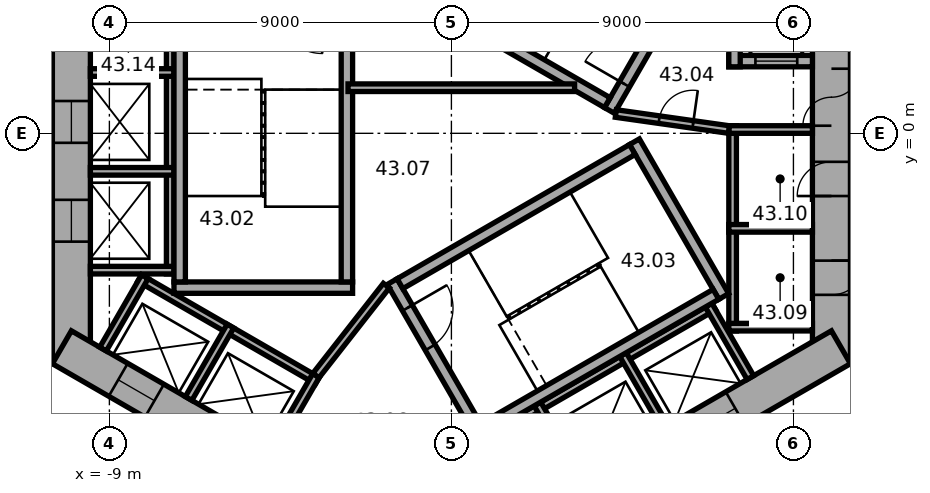
"""IFC4 building model, lengths in metres.
Left out: names, types, materials, properties, quantities, classifications, styles, units other than length and angle.
Written with IfcOpenShell. Run it as: python <this file> out.ifc"""

import sys

from ifc_helpers import new_model, si_unit, direction, frame, frame_2d, origin, place, context, subcontext, project, spatial, rectangle, extrude, element, fill, save


model = new_model("IFC4")
c1 = context("Model", 3, precision=1e-05, world=origin(), true_north=direction((0.0, 1.0)))
c2 = subcontext(c1, "Body", "Model", "MODEL_VIEW")
j1 = project(units=[si_unit("LENGTHUNIT", "METRE"), si_unit("PLANEANGLEUNIT", "RADIAN")], contexts=[c1])
p1 = place(None, origin())
s1 = spatial("IfcSite", under=j1, at=p1, CompositionType="ELEMENT")
p2 = place(p1, origin())
s2 = spatial("IfcBuilding", under=s1, at=p2, CompositionType="ELEMENT")
p3 = place(p2, frame((0.0, 0.0, 176.2)))
s3 = spatial("IfcBuildingStorey", under=s2, at=p3, CompositionType="ELEMENT", Elevation=176.2)
p4 = place(p3, frame((10.0, -6.062, 0.0), z_axis=(0.0, 0.0, 1.0), x_axis=(0.0, 1.0, 0.0)))
e1 = element("IfcWall", 1, at=p4, inside=s3, PredefinedType="SHEAR", context=c2, shape_type="SweptSolid", body=[
    extrude(rectangle(XDim=12.125, YDim=1.0, at=frame_2d((6.062, 0.0))), origin(), (0.0, 0.0, 1.0), 3.7),
])
p5 = place(p4, frame((6.262, 0.0, 0.0)))
e2 = element("IfcOpeningElement", 2, at=p5, cuts=e1, PredefinedType="OPENING", context=c2, shape_type="SweptSolid", body=[
    extrude(rectangle(XDim=1.5, YDim=2.1, at=frame_2d((0.75, 1.05))), frame((0.0, 0.51, 0.0), z_axis=(0.0, -1.0, 0.0), x_axis=(1.0, 0.0, 0.0)), (0.0, 0.0, 1.0), 1.02),
])
p6 = place(p4, frame((1.812, 0.0, 0.0)))
e3 = element("IfcOpeningElement", 3, at=p6, cuts=e1, PredefinedType="OPENING", context=c2, shape_type="SweptSolid", body=[
    extrude(rectangle(XDim=0.9, YDim=2.1, at=frame_2d((0.45, 1.05))), frame((0.0, 0.51, 0.0), z_axis=(0.0, -1.0, 0.0), x_axis=(1.0, 0.0, 0.0)), (0.0, 0.0, 1.0), 1.02),
])
p7 = place(p4, frame((4.412, 0.0, 0.0)))
e4 = element("IfcOpeningElement", 4, at=p7, cuts=e1, PredefinedType="OPENING", context=c2, shape_type="SweptSolid", body=[
    extrude(rectangle(XDim=0.9, YDim=2.1, at=frame_2d((0.45, 1.05))), frame((0.0, 0.51, 0.0), z_axis=(0.0, -1.0, 0.0), x_axis=(1.0, 0.0, 0.0)), (0.0, 0.0, 1.0), 1.02),
])
p8 = place(p3, frame((-10.0, 6.062, 0.0), z_axis=(0.0, 0.0, 1.0), x_axis=(0.0, -1.0, 0.0)))
e5 = element("IfcWall", 5, at=p8, inside=s3, PredefinedType="SHEAR", context=c2, shape_type="SweptSolid", body=[
    extrude(rectangle(XDim=12.125, YDim=1.0, at=frame_2d((6.062, 0.0))), origin(), (0.0, 0.0, 1.0), 3.7),
])
p9 = place(p8, frame((5.212, 0.0, 0.0)))
e6 = element("IfcOpeningElement", 6, at=p9, cuts=e5, PredefinedType="OPENING", context=c2, shape_type="SweptSolid", body=[
    extrude(rectangle(XDim=1.1, YDim=2.1, at=frame_2d((0.55, 1.05))), frame((0.0, 0.51, 0.0), z_axis=(0.0, -1.0, 0.0), x_axis=(1.0, 0.0, 0.0)), (0.0, 0.0, 1.0), 1.02),
])
p10 = place(p8, frame((7.812, 0.0, 0.0)))
e7 = element("IfcOpeningElement", 7, at=p10, cuts=e5, PredefinedType="OPENING", context=c2, shape_type="SweptSolid", body=[
    extrude(rectangle(XDim=1.1, YDim=2.1, at=frame_2d((0.55, 1.05))), frame((0.0, 0.51, 0.0), z_axis=(0.0, -1.0, 0.0), x_axis=(1.0, 0.0, 0.0)), (0.0, 0.0, 1.0), 1.02),
])
p11 = place(p3, frame((-10.25, -5.629, 0.0), z_axis=(0.0, 0.0, 1.0), x_axis=(0.866022616891, -0.50000482701, 0.0)))
e8 = element("IfcWall", 8, at=p11, inside=s3, PredefinedType="SHEAR", context=c2, shape_type="SweptSolid", body=[
    extrude(rectangle(XDim=12.125, YDim=1.0, at=frame_2d((6.062, 0.0))), origin(), (0.0, 0.0, 1.0), 3.7),
])
p12 = place(p11, frame((6.262, 0.0, 0.0)))
e9 = element("IfcOpeningElement", 9, at=p12, cuts=e8, PredefinedType="OPENING", context=c2, shape_type="SweptSolid", body=[
    extrude(rectangle(XDim=1.5, YDim=2.1, at=frame_2d((0.75, 1.05))), frame((0.0, 0.51, 0.0), z_axis=(0.0, -1.0, 0.0), x_axis=(1.0, 0.0, 0.0)), (0.0, 0.0, 1.0), 1.02),
])
p13 = place(p11, frame((1.712, 0.0, 0.0)))
e10 = element("IfcOpeningElement", 10, at=p13, cuts=e8, PredefinedType="OPENING", context=c2, shape_type="SweptSolid", body=[
    extrude(rectangle(XDim=1.1, YDim=2.1, at=frame_2d((0.55, 1.05))), frame((0.0, 0.51, 0.0), z_axis=(0.0, -1.0, 0.0), x_axis=(1.0, 0.0, 0.0)), (0.0, 0.0, 1.0), 1.02),
])
p14 = place(p11, frame((4.312, 0.0, 0.0)))
e11 = element("IfcOpeningElement", 11, at=p14, cuts=e8, PredefinedType="OPENING", context=c2, shape_type="SweptSolid", body=[
    extrude(rectangle(XDim=1.1, YDim=2.1, at=frame_2d((0.55, 1.05))), frame((0.0, 0.51, 0.0), z_axis=(0.0, -1.0, 0.0), x_axis=(1.0, 0.0, 0.0)), (0.0, 0.0, 1.0), 1.02),
])
p15 = place(p3, frame((-0.25, -11.691, 0.0), z_axis=(0.0, 0.0, 1.0), x_axis=(0.866022616891, 0.50000482701, 0.0)))
e12 = element("IfcWall", 12, at=p15, inside=s3, PredefinedType="SHEAR", context=c2, shape_type="SweptSolid", body=[
    extrude(rectangle(XDim=12.125, YDim=1.0, at=frame_2d((6.062, 0.0))), origin(), (0.0, 0.0, 1.0), 3.7),
])
p16 = place(p15, frame((2.612, 0.0, 0.0)))
e13 = element("IfcOpeningElement", 13, at=p16, cuts=e12, PredefinedType="OPENING", context=c2, shape_type="SweptSolid", body=[
    extrude(rectangle(XDim=1.1, YDim=2.1, at=frame_2d((0.55, 1.05))), frame((0.0, 0.51, 0.0), z_axis=(0.0, -1.0, 0.0), x_axis=(1.0, 0.0, 0.0)), (0.0, 0.0, 1.0), 1.02),
])
p17 = place(p15, frame((5.212, 0.0, 0.0)))
e14 = element("IfcOpeningElement", 14, at=p17, cuts=e12, PredefinedType="OPENING", context=c2, shape_type="SweptSolid", body=[
    extrude(rectangle(XDim=1.1, YDim=2.1, at=frame_2d((0.55, 1.05))), frame((0.0, 0.51, 0.0), z_axis=(0.0, -1.0, 0.0), x_axis=(1.0, 0.0, 0.0)), (0.0, 0.0, 1.0), 1.02),
])
p18 = place(p15, frame((7.812, 0.0, 0.0)))
e15 = element("IfcOpeningElement", 15, at=p18, cuts=e12, PredefinedType="OPENING", context=c2, shape_type="SweptSolid", body=[
    extrude(rectangle(XDim=1.1, YDim=2.1, at=frame_2d((0.55, 1.05))), frame((0.0, 0.51, 0.0), z_axis=(0.0, -1.0, 0.0), x_axis=(1.0, 0.0, 0.0)), (0.0, 0.0, 1.0), 1.02),
])
p19 = place(p3, frame((7.4, -5.2, 0.0), z_axis=(0.0, 0.0, 1.0), x_axis=(0.0, 1.0, 0.0)))
e16 = element("IfcWall", 16, at=p19, inside=s3, PredefinedType="PARTITIONING", context=c2, shape_type="SweptSolid", body=[
    extrude(rectangle(XDim=5.4, YDim=0.2, at=frame_2d((2.7, 0.0))), origin(), (0.0, 0.0, 1.0), 3.42),
])
for number, where, z_axis, x_axis in (
    (17, (7.3, -5.1, 0.0), (0.0, 0.0, 1.0), (1.0, 0.0, 0.0)),
    (18, (7.3, -2.5, 0.0), (0.0, 0.0, 1.0), (1.0, 0.0, 0.0)),
    (19, (7.3, 0.1, 0.0), (0.0, 0.0, 1.0), (1.0, 0.0, 0.0)),
):
    element("IfcWall", number, at=place(p3, frame(where, z_axis=z_axis, x_axis=x_axis)), inside=s3, PredefinedType="PARTITIONING", context=c2, shape_type="SweptSolid", body=[
        extrude(rectangle(XDim=2.2, YDim=0.2, at=frame_2d((1.1, 0.0))), origin(), (0.0, 0.0, 1.0), 3.42),
    ])
p20 = place(p3, frame((-7.4, 4.3, 0.0), z_axis=(0.0, 0.0, 1.0), x_axis=(0.0, -1.0, 0.0)))
e20 = element("IfcWall", 20, at=p20, inside=s3, PredefinedType="PARTITIONING", context=c2, shape_type="SweptSolid", body=[
    extrude(rectangle(XDim=8.0, YDim=0.2, at=frame_2d((4.0, 0.0))), origin(), (0.0, 0.0, 1.0), 3.42),
])
for number, where, z_axis, x_axis in (
    (21, (-7.3, 1.6, 0.0), (0.0, 0.0, 1.0), (-1.0, 0.0, 0.0)),
    (22, (-7.3, -1.0, 0.0), (0.0, 0.0, 1.0), (-1.0, 0.0, 0.0)),
    (23, (-7.3, -3.6, 0.0), (0.0, 0.0, 1.0), (-1.0, 0.0, 0.0)),
):
    element("IfcWall", number, at=place(p3, frame(where, z_axis=z_axis, x_axis=x_axis)), inside=s3, PredefinedType="PARTITIONING", context=c2, shape_type="SweptSolid", body=[
        extrude(rectangle(XDim=2.2, YDim=0.2, at=frame_2d((1.1, 0.0))), origin(), (0.0, 0.0, 1.0), 3.42),
    ])
p21 = place(p3, frame((-8.203, -3.809, 0.0), z_axis=(0.0, 0.0, 1.0), x_axis=(0.866028230842, -0.499995103361, 0.0)))
e24 = element("IfcWall", 24, at=p21, inside=s3, PredefinedType="PARTITIONING", context=c2, shape_type="SweptSolid", body=[
    extrude(rectangle(XDim=5.4, YDim=0.2, at=frame_2d((2.7, 0.0))), origin(), (0.0, 0.0, 1.0), 3.42),
])
for number, where, z_axis, x_axis in (
    (25, (-8.067, -3.772, 0.0), (0.0, 0.0, 1.0), (-0.5, -0.866, 0.0)),
    (26, (-5.815, -5.072, 0.0), (0.0, 0.0, 1.0), (-0.5, -0.866, 0.0)),
):
    element("IfcWall", number, at=place(p3, frame(where, z_axis=z_axis, x_axis=x_axis)), inside=s3, PredefinedType="PARTITIONING", context=c2, shape_type="SweptSolid", body=[
        extrude(rectangle(XDim=2.2, YDim=0.2, at=frame_2d((1.1, 0.0))), origin(), (0.0, 0.0, 1.0), 3.42),
    ])
p22 = place(p3, frame((-3.563, -6.372, 0.0), z_axis=(0.0, 0.0, 1.0), x_axis=(-0.499994660107, -0.866028486751, 0.0)))
e27 = element("IfcWall", 27, at=p22, inside=s3, PredefinedType="PARTITIONING", context=c2, shape_type="SweptSolid", body=[
    extrude(rectangle(XDim=2.2, YDim=0.2, at=frame_2d((1.1, 0.0))), origin(), (0.0, 0.0, 1.0), 3.42),
])
p23 = place(p3, frame((-0.024, -8.559, 0.0), z_axis=(0.0, 0.0, 1.0), x_axis=(0.866026010844, 0.49999894854, 0.0)))
e28 = element("IfcWall", 28, at=p23, inside=s3, PredefinedType="PARTITIONING", context=c2, shape_type="SweptSolid", body=[
    extrude(rectangle(XDim=8.0, YDim=0.2, at=frame_2d((4.0, 0.0))), origin(), (0.0, 0.0, 1.0), 3.42),
])
for number, where, z_axis, x_axis in (
    (29, (2.264, -7.122, 0.0), (0.0, 0.0, 1.0), (0.5, -0.866, 0.0)),
    (30, (4.516, -5.822, 0.0), (0.0, 0.0, 1.0), (0.5, -0.866, 0.0)),
    (31, (6.768, -4.522, 0.0), (0.0, 0.0, 1.0), (0.5, -0.866, 0.0)),
):
    element("IfcWall", number, at=place(p3, frame(where, z_axis=z_axis, x_axis=x_axis)), inside=s3, PredefinedType="PARTITIONING", context=c2, shape_type="SweptSolid", body=[
        extrude(rectangle(XDim=2.2, YDim=0.2, at=frame_2d((1.1, 0.0))), origin(), (0.0, 0.0, 1.0), 3.42),
    ])
p24 = place(p3, frame((4.158, 0.602, 0.0), z_axis=(0.0, 0.0, 1.0), x_axis=(0.499977259774, 0.866038532462, 0.0)))
e32 = element("IfcWall", 32, at=p24, inside=s3, PredefinedType="SHEAR", context=c2, shape_type="SweptSolid", body=[
    extrude(rectangle(XDim=4.7, YDim=0.3, at=frame_2d((2.35, 0.0))), origin(), (0.0, 0.0, 1.0), 3.42),
])
p25 = place(p24, frame((0.8, 0.0, 0.0)))
e33 = element("IfcOpeningElement", 33, at=p25, cuts=e32, PredefinedType="OPENING", context=c2, shape_type="SweptSolid", body=[
    extrude(rectangle(XDim=1.2, YDim=2.1, at=frame_2d((0.6, 1.05))), frame((0.0, 0.16, 0.0), z_axis=(0.0, -1.0, 0.0), x_axis=(1.0, 0.0, 0.0)), (0.0, 0.0, 1.0), 0.32),
])
p26 = place(p3, frame((4.103, 0.807, 0.0), z_axis=(0.0, 0.0, 1.0), x_axis=(-0.866027801685, 0.499995846692, 0.0)))
e34 = element("IfcWall", 34, at=p26, inside=s3, PredefinedType="SHEAR", context=c2, shape_type="SweptSolid", body=[
    extrude(rectangle(XDim=7.06, YDim=0.3, at=frame_2d((3.53, 0.0))), origin(), (0.0, 0.0, 1.0), 3.42),
])
p27 = place(p3, frame((-2.6, -4.06, 0.0), z_axis=(0.0, 0.0, 1.0), x_axis=(-1.0, 0.0, 0.0)))
e35 = element("IfcWall", 35, at=p27, inside=s3, PredefinedType="SHEAR", context=c2, shape_type="SweptSolid", body=[
    extrude(rectangle(XDim=4.7, YDim=0.3, at=frame_2d((2.35, 0.0))), origin(), (0.0, 0.0, 1.0), 3.42),
])
for number, where, z_axis, x_axis in (
    (36, (-2.75, 3.15, 0.0), (0.0, 0.0, 1.0), (0.0, -1.0, 0.0)),
    (37, (-7.15, 3.15, 0.0), (0.0, 0.0, 1.0), (0.0, -1.0, 0.0)),
):
    element("IfcWall", number, at=place(p3, frame(where, z_axis=z_axis, x_axis=x_axis)), inside=s3, PredefinedType="SHEAR", context=c2, shape_type="SweptSolid", body=[
        extrude(rectangle(XDim=7.06, YDim=0.3, at=frame_2d((3.53, 0.0))), origin(), (0.0, 0.0, 1.0), 3.42),
    ])
p28 = place(p3, frame((-1.558, -3.902, 0.0), z_axis=(0.0, 0.0, 1.0), x_axis=(0.499977259774, -0.866038532462, 0.0)))
e38 = element("IfcWall", 38, at=p28, inside=s3, PredefinedType="SHEAR", context=c2, shape_type="SweptSolid", body=[
    extrude(rectangle(XDim=4.7, YDim=0.3, at=frame_2d((2.35, 0.0))), origin(), (0.0, 0.0, 1.0), 3.42),
])
p29 = place(p28, frame((0.8, 0.0, 0.0)))
e39 = element("IfcOpeningElement", 39, at=p29, cuts=e38, PredefinedType="OPENING", context=c2, shape_type="SweptSolid", body=[
    extrude(rectangle(XDim=1.2, YDim=2.1, at=frame_2d((0.6, 1.05))), frame((0.0, 0.16, 0.0), z_axis=(0.0, -1.0, 0.0), x_axis=(1.0, 0.0, 0.0)), (0.0, 0.0, 1.0), 0.32),
])
p30 = place(p3, frame((4.816, -0.222, 0.0), z_axis=(0.0, 0.0, 1.0), x_axis=(0.499977259774, -0.866038532462, 0.0)))
e40 = element("IfcWall", 40, at=p30, inside=s3, PredefinedType="SHEAR", context=c2, shape_type="SweptSolid", body=[
    extrude(rectangle(XDim=4.7, YDim=0.3, at=frame_2d((2.35, 0.0))), origin(), (0.0, 0.0, 1.0), 3.42),
])
for number, where, z_axis, x_axis in (
    (41, (-1.353, -3.957, 0.0), (0.0, 0.0, 1.0), (0.866, 0.5, 0.0)),
    (42, (0.847, -7.767, 0.0), (0.0, 0.0, 1.0), (0.866, 0.5, 0.0)),
):
    element("IfcWall", number, at=place(p3, frame(where, z_axis=z_axis, x_axis=x_axis)), inside=s3, PredefinedType="SHEAR", context=c2, shape_type="SweptSolid", body=[
        extrude(rectangle(XDim=7.06, YDim=0.3, at=frame_2d((3.53, 0.0))), origin(), (0.0, 0.0, 1.0), 3.42),
    ])
p31 = place(p3, frame((7.3, 1.9, 0.0), z_axis=(0.0, 0.0, 1.0), x_axis=(1.0, 0.0, 0.0)))
e43 = element("IfcWall", 43, at=p31, inside=s3, PredefinedType="SHEAR", context=c2, shape_type="SweptSolid", body=[
    extrude(rectangle(XDim=2.2, YDim=0.3, at=frame_2d((1.1, 0.0))), origin(), (0.0, 0.0, 1.0), 3.42),
])
p32 = place(p31, frame((0.7, 0.0, 0.0)))
e44 = element("IfcOpeningElement", 44, at=p32, cuts=e43, PredefinedType="OPENING", context=c2, shape_type="SweptSolid", body=[
    extrude(rectangle(XDim=1.1, YDim=2.1, at=frame_2d((0.55, 1.05))), frame((0.0, 0.16, 0.0), z_axis=(0.0, -1.0, 0.0), x_axis=(1.0, 0.0, 0.0)), (0.0, 0.0, 1.0), 0.32),
])
p33 = place(p3, frame((7.45, 1.75, 0.0), z_axis=(0.0, 0.0, 1.0), x_axis=(0.0, 1.0, 0.0)))
e45 = element("IfcWall", 45, at=p33, inside=s3, PredefinedType="SHEAR", context=c2, shape_type="SweptSolid", body=[
    extrude(rectangle(XDim=3.35, YDim=0.3, at=frame_2d((1.675, 0.0))), origin(), (0.0, 0.0, 1.0), 3.42),
])
p34 = place(p3, frame((4.327, 0.521, 0.0), z_axis=(0.0, 0.0, 1.0), x_axis=(0.990124376366, -0.14019172346, 0.0)))
e46 = element("IfcWall", 46, at=p34, inside=s3, PredefinedType="PARTITIONING", context=c2, shape_type="SweptSolid", body=[
    extrude(rectangle(XDim=3.002, YDim=0.2, at=frame_2d((1.501, 0.0))), origin(), (0.0, 0.0, 1.0), 3.42),
])
p35 = place(p34, frame((1.15, 0.0, 0.0)))
e47 = element("IfcOpeningElement", 47, at=p35, cuts=e46, PredefinedType="OPENING", context=c2, shape_type="SweptSolid", body=[
    extrude(rectangle(XDim=0.9, YDim=2.1, at=frame_2d((0.45, 1.05))), frame((0.0, 0.11, 0.0), z_axis=(0.0, -1.0, 0.0), x_axis=(1.0, 0.0, 0.0)), (0.0, 0.0, 1.0), 0.22),
])
p36 = place(p3, frame((-1.712, -4.008, 0.0), z_axis=(0.0, 0.0, 1.0), x_axis=(-0.616549420702, -0.787316208287, 0.0)))
e48 = element("IfcWall", 48, at=p36, inside=s3, PredefinedType="PARTITIONING", context=c2, shape_type="SweptSolid", body=[
    extrude(rectangle(XDim=3.002, YDim=0.2, at=frame_2d((1.501, 0.0))), origin(), (0.0, 0.0, 1.0), 3.42),
])
p37 = place(p3, frame((-2.72, 1.2, 0.0), z_axis=(0.0, 0.0, 1.0), x_axis=(1.0, 0.0, 0.0)))
e49 = element("IfcWall", 49, at=p37, inside=s3, PredefinedType="PARTITIONING", context=c2, shape_type="SweptSolid", body=[
    extrude(rectangle(XDim=5.961, YDim=0.2, at=frame_2d((2.981, 0.0))), origin(), (0.0, 0.0, 1.0), 3.42),
])
p38 = place(p5, origin())
e50 = element("IfcDoor", 50, at=p38, inside=s3, OperationType="DOUBLE_DOOR_SINGLE_SWING", PredefinedType="DOOR", context=c2, shape_type="SweptSolid", body=[
    extrude(rectangle(XDim=1.5, YDim=2.1, at=frame_2d((0.75, 1.05))), frame((0.0, 0.025, 0.0), z_axis=(0.0, -1.0, 0.0), x_axis=(1.0, 0.0, 0.0)), (0.0, 0.0, 1.0), 0.05),
])
fill(e2, e50)
p39 = place(p25, origin())
e51 = element("IfcDoor", 51, at=p39, inside=s3, OperationType="SINGLE_SWING_RIGHT", PredefinedType="DOOR", context=c2, shape_type="SweptSolid", body=[
    extrude(rectangle(XDim=1.2, YDim=2.1, at=frame_2d((0.6, 1.05))), frame((0.0, 0.025, 0.0), z_axis=(0.0, -1.0, 0.0), x_axis=(1.0, 0.0, 0.0)), (0.0, 0.0, 1.0), 0.05),
])
fill(e33, e51)
p40 = place(p29, origin())
e52 = element("IfcDoor", 52, at=p40, inside=s3, OperationType="SINGLE_SWING_RIGHT", PredefinedType="DOOR", context=c2, shape_type="SweptSolid", body=[
    extrude(rectangle(XDim=1.2, YDim=2.1, at=frame_2d((0.6, 1.05))), frame((0.0, 0.025, 0.0), z_axis=(0.0, -1.0, 0.0), x_axis=(1.0, 0.0, 0.0)), (0.0, 0.0, 1.0), 0.05),
])
fill(e39, e52)
p41 = place(p35, origin())
e53 = element("IfcDoor", 53, at=p41, inside=s3, OperationType="SINGLE_SWING_LEFT", PredefinedType="DOOR", context=c2, shape_type="SweptSolid", body=[
    extrude(rectangle(XDim=0.9, YDim=2.1, at=frame_2d((0.45, 1.05))), frame((0.0, 0.025, 0.0), z_axis=(0.0, -1.0, 0.0), x_axis=(1.0, 0.0, 0.0)), (0.0, 0.0, 1.0), 0.05),
])
fill(e47, e53)
p42 = place(p6, origin())
e54 = element("IfcDoor", 54, at=p42, inside=s3, OperationType="SINGLE_SWING_LEFT", PredefinedType="DOOR", context=c2, shape_type="SweptSolid", body=[
    extrude(rectangle(XDim=0.9, YDim=2.1, at=frame_2d((0.45, 1.05))), frame((0.0, 0.025, 0.0), z_axis=(0.0, -1.0, 0.0), x_axis=(1.0, 0.0, 0.0)), (0.0, 0.0, 1.0), 0.05),
])
fill(e3, e54)
p43 = place(p7, origin())
e55 = element("IfcDoor", 55, at=p43, inside=s3, OperationType="SINGLE_SWING_LEFT", PredefinedType="DOOR", context=c2, shape_type="SweptSolid", body=[
    extrude(rectangle(XDim=0.9, YDim=2.1, at=frame_2d((0.45, 1.05))), frame((0.0, 0.025, 0.0), z_axis=(0.0, -1.0, 0.0), x_axis=(1.0, 0.0, 0.0)), (0.0, 0.0, 1.0), 0.05),
])
fill(e4, e55)
p44 = place(p32, origin())
e56 = element("IfcDoor", 56, at=p44, inside=s3, OperationType="DOUBLE_DOOR_SLIDING", PredefinedType="DOOR", context=c2, shape_type="SweptSolid", body=[
    extrude(rectangle(XDim=1.1, YDim=2.1, at=frame_2d((0.55, 1.05))), frame((0.0, 0.025, 0.0), z_axis=(0.0, -1.0, 0.0), x_axis=(1.0, 0.0, 0.0)), (0.0, 0.0, 1.0), 0.05),
])
fill(e44, e56)
p45 = place(p9, origin())
e57 = element("IfcDoor", 57, at=p45, inside=s3, OperationType="DOUBLE_DOOR_SLIDING", PredefinedType="DOOR", context=c2, shape_type="SweptSolid", body=[
    extrude(rectangle(XDim=1.1, YDim=2.1, at=frame_2d((0.55, 1.05))), frame((0.0, 0.025, 0.0), z_axis=(0.0, -1.0, 0.0), x_axis=(1.0, 0.0, 0.0)), (0.0, 0.0, 1.0), 0.05),
])
fill(e6, e57)
p46 = place(p10, origin())
e58 = element("IfcDoor", 58, at=p46, inside=s3, OperationType="DOUBLE_DOOR_SLIDING", PredefinedType="DOOR", context=c2, shape_type="SweptSolid", body=[
    extrude(rectangle(XDim=1.1, YDim=2.1, at=frame_2d((0.55, 1.05))), frame((0.0, 0.025, 0.0), z_axis=(0.0, -1.0, 0.0), x_axis=(1.0, 0.0, 0.0)), (0.0, 0.0, 1.0), 0.05),
])
fill(e7, e58)
p47 = place(p13, origin())
e59 = element("IfcDoor", 59, at=p47, inside=s3, OperationType="DOUBLE_DOOR_SLIDING", PredefinedType="DOOR", context=c2, shape_type="SweptSolid", body=[
    extrude(rectangle(XDim=1.1, YDim=2.1, at=frame_2d((0.55, 1.05))), frame((0.0, 0.025, 0.0), z_axis=(0.0, -1.0, 0.0), x_axis=(1.0, 0.0, 0.0)), (0.0, 0.0, 1.0), 0.05),
])
fill(e10, e59)
p48 = place(p18, origin())
e60 = element("IfcDoor", 60, at=p48, inside=s3, OperationType="DOUBLE_DOOR_SLIDING", PredefinedType="DOOR", context=c2, shape_type="SweptSolid", body=[
    extrude(rectangle(XDim=1.1, YDim=2.1, at=frame_2d((0.55, 1.05))), frame((0.0, 0.025, 0.0), z_axis=(0.0, -1.0, 0.0), x_axis=(1.0, 0.0, 0.0)), (0.0, 0.0, 1.0), 0.05),
])
fill(e15, e60)
save(model, sys.argv[1])
